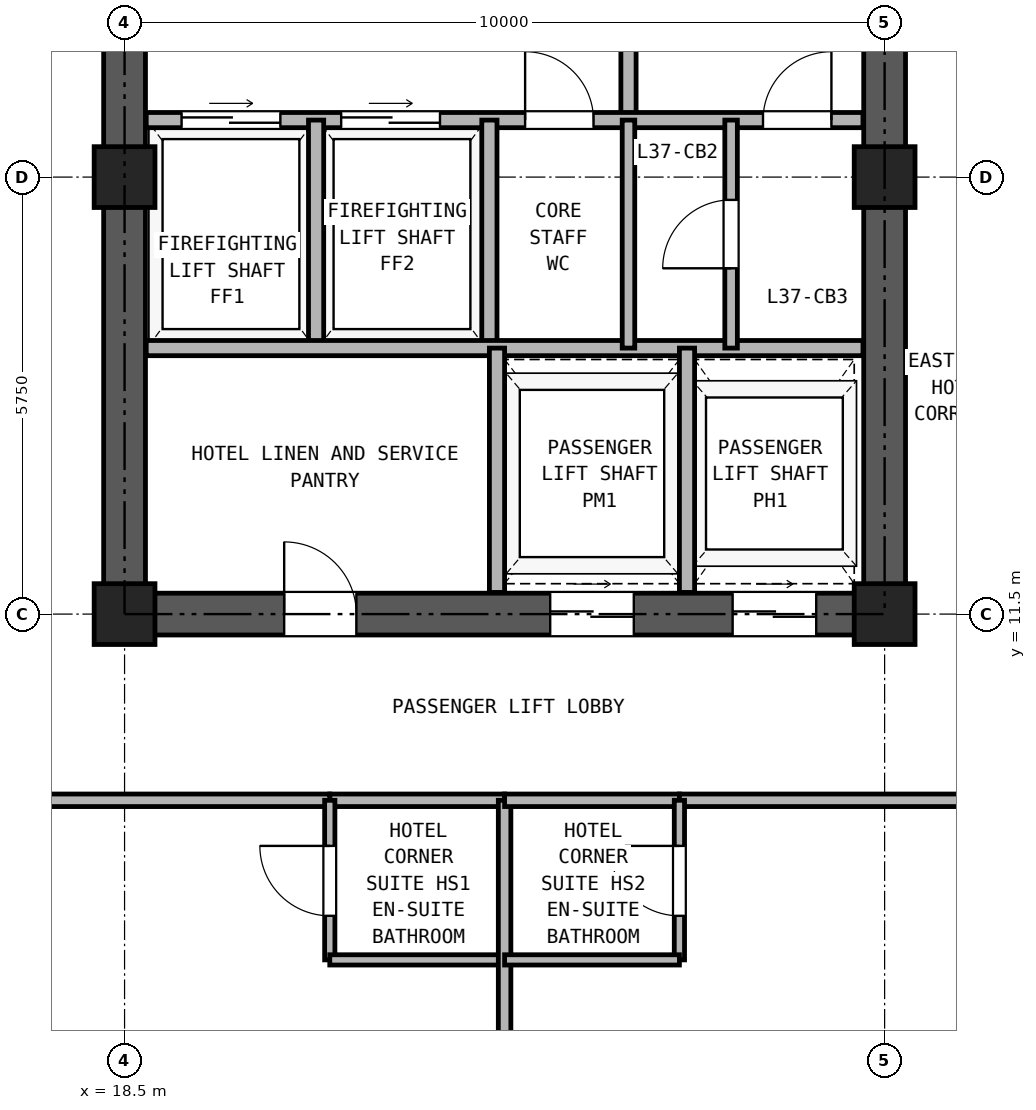
"""IFC4 building model, lengths in metres.
Left out: names, types, materials, properties, quantities, classifications, styles, units other than length and angle.
Written with IfcOpenShell. Run it as: python <this file> out.ifc"""

import sys

from ifc_helpers import new_model, si_unit, direction, frame, frame_2d, origin, origin_2d, place, context, subcontext, project, spatial, rectangle, hollow_rectangle, extrude, source, transform, mapped, element, fill, save


model = new_model("IFC4")
c1 = context("Model", 3, precision=1e-05, world=origin(), true_north=direction((0.0, 1.0)))
c2 = subcontext(c1, "Body", "Model", "MODEL_VIEW")
j1 = project(units=[si_unit("LENGTHUNIT", "METRE"), si_unit("PLANEANGLEUNIT", "RADIAN")], contexts=[c1])
p1 = place(None, origin())
s1 = spatial("IfcSite", under=j1, at=p1, CompositionType="ELEMENT")
p2 = place(p1, origin())
s2 = spatial("IfcBuilding", under=s1, at=p2, CompositionType="ELEMENT")
p3 = place(p2, frame((0.0, 0.0, 134.3)))
s3 = spatial("IfcBuildingStorey", under=s2, at=p3, CompositionType="ELEMENT", Elevation=134.3)
m1 = source(origin(), c2, "Body", "SweptSolid", [
    extrude(hollow_rectangle(XDim=0.8, YDim=0.8, WallThickness=0.045, at=origin_2d()), origin(), (0.0, 0.0, 1.0), 2.95),
])
for number, where, z_axis, x_axis in (
    (1, (18.5, 11.5, 0.0), (0.0, 0.0, 1.0), (1.0, 0.0, 0.0)),
    (2, (18.5, 17.25, 0.0), (0.0, 0.0, 1.0), (1.0, 0.0, 0.0)),
    (3, (28.5, 11.5, 0.0), (0.0, 0.0, 1.0), (1.0, 0.0, 0.0)),
    (4, (28.5, 17.25, 0.0), (0.0, 0.0, 1.0), (1.0, 0.0, 0.0)),
):
    element("IfcColumn", number, at=place(p3, frame(where, z_axis=z_axis, x_axis=x_axis)), inside=s3, PredefinedType="COLUMN", context=c2, shape_type="MappedRepresentation", body=[
        mapped(m1, transform((0.0, 0.0, 0.0), x_axis=(1.0, 0.0, 0.0), y_axis=(0.0, 1.0, 0.0), z_axis=(0.0, 0.0, 1.0), scale=1.0)),
    ])
p4 = place(p3, frame((18.225, 11.5, 0.0), z_axis=(0.0, 0.0, 1.0), x_axis=(1.0, 0.0, 0.0)))
e5 = element("IfcWall", 5, at=p4, inside=s3, PredefinedType="SHEAR", context=c2, shape_type="SweptSolid", body=[
    extrude(rectangle(XDim=10.55, YDim=0.55, at=frame_2d((5.275, 0.0))), origin(), (0.0, 0.0, 1.0), 2.95),
])
p5 = place(p4, frame((2.375, 0.0, 0.0)))
e6 = element("IfcOpeningElement", 6, at=p5, cuts=e5, PredefinedType="OPENING", context=c2, shape_type="SweptSolid", body=[
    extrude(rectangle(XDim=0.95, YDim=2.15, at=frame_2d((0.475, 1.075))), frame((0.0, 0.285, 0.0), z_axis=(0.0, -1.0, 0.0), x_axis=(1.0, 0.0, 0.0)), (0.0, 0.0, 1.0), 0.57),
])
p6 = place(p4, frame((5.875, 0.0, 0.0)))
e7 = element("IfcOpeningElement", 7, at=p6, cuts=e5, PredefinedType="OPENING", context=c2, shape_type="SweptSolid", body=[
    extrude(rectangle(XDim=1.1, YDim=2.25, at=frame_2d((0.55, 1.125))), frame((0.0, 0.285, 0.0), z_axis=(0.0, -1.0, 0.0), x_axis=(1.0, 0.0, 0.0)), (0.0, 0.0, 1.0), 0.57),
])
p7 = place(p4, frame((8.275, 0.0, 0.0)))
e8 = element("IfcOpeningElement", 8, at=p7, cuts=e5, PredefinedType="OPENING", context=c2, shape_type="SweptSolid", body=[
    extrude(rectangle(XDim=1.1, YDim=2.25, at=frame_2d((0.55, 1.125))), frame((0.0, 0.285, 0.0), z_axis=(0.0, -1.0, 0.0), x_axis=(1.0, 0.0, 0.0)), (0.0, 0.0, 1.0), 0.57),
])
p8 = place(p3, frame((18.5, 11.775, 0.0), z_axis=(0.0, 0.0, 1.0), x_axis=(0.0, 1.0, 0.0)))
e9 = element("IfcWall", 9, at=p8, inside=s3, PredefinedType="SHEAR", context=c2, shape_type="SweptSolid", body=[
    extrude(rectangle(XDim=16.7, YDim=0.55, at=frame_2d((8.35, 0.0))), origin(), (0.0, 0.0, 1.0), 2.95),
])
p9 = place(p8, frame((7.375, 0.0, 0.0)))
e10 = element("IfcOpeningElement", 10, at=p9, cuts=e9, PredefinedType="OPENING", context=c2, shape_type="SweptSolid", body=[
    extrude(rectangle(XDim=1.15, YDim=2.2, at=frame_2d((0.575, 1.1))), frame((0.0, 0.285, 0.0), z_axis=(0.0, -1.0, 0.0), x_axis=(1.0, 0.0, 0.0)), (0.0, 0.0, 1.0), 0.57),
])
p10 = place(p3, frame((28.5, 11.775, 0.0), z_axis=(0.0, 0.0, 1.0), x_axis=(0.0, 1.0, 0.0)))
e11 = element("IfcWall", 11, at=p10, inside=s3, PredefinedType="SHEAR", context=c2, shape_type="SweptSolid", body=[
    extrude(rectangle(XDim=16.7, YDim=0.55, at=frame_2d((8.35, 0.0))), origin(), (0.0, 0.0, 1.0), 2.95),
])
p11 = place(p10, frame((7.375, 0.0, 0.0)))
e12 = element("IfcOpeningElement", 12, at=p11, cuts=e11, PredefinedType="OPENING", context=c2, shape_type="SweptSolid", body=[
    extrude(rectangle(XDim=1.15, YDim=2.2, at=frame_2d((0.575, 1.1))), frame((0.0, 0.285, 0.0), z_axis=(0.0, -1.0, 0.0), x_axis=(1.0, 0.0, 0.0)), (0.0, 0.0, 1.0), 0.57),
])
p12 = place(p3, frame((25.13, 18.0, 0.0), z_axis=(0.0, 0.0, 1.0), x_axis=(0.0, 1.0, 0.0)))
e13 = element("IfcWall", 13, at=p12, inside=s3, PredefinedType="PARTITIONING", context=c2, shape_type="SweptSolid", body=[
    extrude(rectangle(XDim=3.39, YDim=0.2, at=frame_2d((1.695, 0.0))), origin(), (0.0, 0.0, 1.0), 2.95),
])
p13 = place(p12, frame((1.1, 0.0, 0.0)))
e14 = element("IfcOpeningElement", 14, at=p13, cuts=e13, PredefinedType="OPENING", context=c2, shape_type="SweptSolid", body=[
    extrude(rectangle(XDim=1.15, YDim=2.2, at=frame_2d((0.575, 1.1))), frame((0.0, 0.11, 0.0), z_axis=(0.0, -1.0, 0.0), x_axis=(1.0, 0.0, 0.0)), (0.0, 0.0, 1.0), 0.22),
])
p14 = place(p3, frame((18.785, 18.0, 0.0), z_axis=(0.0, 0.0, 1.0), x_axis=(1.0, 0.0, 0.0)))
e15 = element("IfcWall", 15, at=p14, inside=s3, PredefinedType="PARTITIONING", context=c2, shape_type="SweptSolid", body=[
    extrude(rectangle(XDim=9.43, YDim=0.2, at=frame_2d((4.715, 0.0))), origin(), (0.0, 0.0, 1.0), 2.95),
])
p15 = place(p14, frame((0.465, 0.0, 0.0)))
e16 = element("IfcOpeningElement", 16, at=p15, cuts=e15, PredefinedType="OPENING", context=c2, shape_type="SweptSolid", body=[
    extrude(rectangle(XDim=1.3, YDim=2.3, at=frame_2d((0.65, 1.15))), frame((0.0, 0.11, 0.0), z_axis=(0.0, -1.0, 0.0), x_axis=(1.0, 0.0, 0.0)), (0.0, 0.0, 1.0), 0.22),
])
p16 = place(p14, frame((2.565, 0.0, 0.0)))
e17 = element("IfcOpeningElement", 17, at=p16, cuts=e15, PredefinedType="OPENING", context=c2, shape_type="SweptSolid", body=[
    extrude(rectangle(XDim=1.3, YDim=2.3, at=frame_2d((0.65, 1.15))), frame((0.0, 0.11, 0.0), z_axis=(0.0, -1.0, 0.0), x_axis=(1.0, 0.0, 0.0)), (0.0, 0.0, 1.0), 0.22),
])
p17 = place(p14, frame((4.985, 0.0, 0.0)))
e18 = element("IfcOpeningElement", 18, at=p17, cuts=e15, PredefinedType="OPENING", context=c2, shape_type="SweptSolid", body=[
    extrude(rectangle(XDim=0.9, YDim=2.05, at=frame_2d((0.45, 1.025))), frame((0.0, 0.11, 0.0), z_axis=(0.0, -1.0, 0.0), x_axis=(1.0, 0.0, 0.0)), (0.0, 0.0, 1.0), 0.22),
])
p18 = place(p14, frame((8.115, 0.0, 0.0)))
e19 = element("IfcOpeningElement", 19, at=p18, cuts=e15, PredefinedType="OPENING", context=c2, shape_type="SweptSolid", body=[
    extrude(rectangle(XDim=0.9, YDim=2.05, at=frame_2d((0.45, 1.025))), frame((0.0, 0.11, 0.0), z_axis=(0.0, -1.0, 0.0), x_axis=(1.0, 0.0, 0.0)), (0.0, 0.0, 1.0), 0.22),
])
for number, where, z_axis, x_axis in (
    (20, (21.02, 15.0, 0.0), (0.0, 0.0, 1.0), (0.0, 1.0, 0.0)),
    (21, (23.3, 15.0, 0.0), (0.0, 0.0, 1.0), (0.0, 1.0, 0.0)),
):
    element("IfcWall", number, at=place(p3, frame(where, z_axis=z_axis, x_axis=x_axis)), inside=s3, PredefinedType="PARTITIONING", context=c2, shape_type="SweptSolid", body=[
        extrude(rectangle(XDim=3.0, YDim=0.2, at=frame_2d((1.5, 0.0))), origin(), (0.0, 0.0, 1.0), 2.95),
    ])
p19 = place(p3, frame((18.785, 15.0, 0.0), z_axis=(0.0, 0.0, 1.0), x_axis=(1.0, 0.0, 0.0)))
e22 = element("IfcWall", 22, at=p19, inside=s3, PredefinedType="PARTITIONING", context=c2, shape_type="SweptSolid", body=[
    extrude(rectangle(XDim=9.43, YDim=0.2, at=frame_2d((4.715, 0.0))), origin(), (0.0, 0.0, 1.0), 2.95),
])
p20 = place(p3, frame((25.13, 15.0, 0.0), z_axis=(0.0, 0.0, 1.0), x_axis=(0.0, 1.0, 0.0)))
e23 = element("IfcWall", 23, at=p20, inside=s3, PredefinedType="PARTITIONING", context=c2, shape_type="SweptSolid", body=[
    extrude(rectangle(XDim=3.0, YDim=0.165, at=frame_2d((1.5, 0.0))), origin(), (0.0, 0.0, 1.0), 2.95),
])
p21 = place(p3, frame((26.48, 15.0, 0.0), z_axis=(0.0, 0.0, 1.0), x_axis=(0.0, 1.0, 0.0)))
e24 = element("IfcWall", 24, at=p21, inside=s3, PredefinedType="PARTITIONING", context=c2, shape_type="SweptSolid", body=[
    extrude(rectangle(XDim=3.0, YDim=0.165, at=frame_2d((1.5, 0.0))), origin(), (0.0, 0.0, 1.0), 2.95),
])
p22 = place(p21, frame((1.05, 0.0, 0.0)))
e25 = element("IfcOpeningElement", 25, at=p22, cuts=e24, PredefinedType="OPENING", context=c2, shape_type="SweptSolid", body=[
    extrude(rectangle(XDim=0.9, YDim=2.05, at=frame_2d((0.45, 1.025))), frame((0.0, 0.093, 0.0), z_axis=(0.0, -1.0, 0.0), x_axis=(1.0, 0.0, 0.0)), (0.0, 0.0, 1.0), 0.185),
])
for number, where, z_axis, x_axis in (
    (26, (23.4, 11.785, 0.0), (0.0, 0.0, 1.0), (0.0, 1.0, 0.0)),
    (27, (25.9, 11.785, 0.0), (0.0, 0.0, 1.0), (0.0, 1.0, 0.0)),
):
    element("IfcWall", number, at=place(p3, frame(where, z_axis=z_axis, x_axis=x_axis)), inside=s3, PredefinedType="PARTITIONING", context=c2, shape_type="SweptSolid", body=[
        extrude(rectangle(XDim=3.215, YDim=0.2, at=frame_2d((1.607, 0.0))), origin(), (0.0, 0.0, 1.0), 2.95),
    ])
p23 = place(p3, frame((21.2, 9.05, 0.0), z_axis=(0.0, 0.0, 1.0), x_axis=(1.0, 0.0, 0.0)))
e28 = element("IfcWall", 28, at=p23, inside=s3, PredefinedType="PARTITIONING", context=c2, shape_type="SweptSolid", body=[
    extrude(rectangle(XDim=2.3, YDim=0.165, at=frame_2d((1.15, 0.0))), origin(), (0.0, 0.0, 1.0), 2.95),
])
p24 = place(p3, frame((6.6, 9.05, 0.0), z_axis=(0.0, 0.0, 1.0), x_axis=(1.0, 0.0, 0.0)))
e29 = element("IfcWall", 29, at=p24, inside=s3, PredefinedType="PARTITIONING", context=c2, shape_type="SweptSolid", body=[
    extrude(rectangle(XDim=14.6, YDim=0.165, at=frame_2d((7.3, 0.0))), origin(), (0.0, 0.0, 1.0), 2.95),
])
p25 = place(p24, frame((6.8, 0.0, 0.0)))
e30 = element("IfcOpeningElement", 30, at=p25, cuts=e29, PredefinedType="OPENING", context=c2, shape_type="SweptSolid", body=[
    extrude(rectangle(XDim=1.0, YDim=2.15, at=frame_2d((0.5, 1.075))), frame((0.0, 0.093, 0.0), z_axis=(0.0, -1.0, 0.0), x_axis=(1.0, 0.0, 0.0)), (0.0, 0.0, 1.0), 0.185),
])
p26 = place(p3, frame((21.2, 6.95, 0.0), z_axis=(0.0, 0.0, 1.0), x_axis=(0.0, 1.0, 0.0)))
e31 = element("IfcWall", 31, at=p26, inside=s3, PredefinedType="PARTITIONING", context=c2, shape_type="SweptSolid", body=[
    extrude(rectangle(XDim=2.1, YDim=0.135, at=frame_2d((1.05, 0.0))), origin(), (0.0, 0.0, 1.0), 2.95),
])
p27 = place(p26, frame((0.58, 0.0, 0.0)))
e32 = element("IfcOpeningElement", 32, at=p27, cuts=e31, PredefinedType="OPENING", context=c2, shape_type="SweptSolid", body=[
    extrude(rectangle(XDim=0.92, YDim=2.1, at=frame_2d((0.46, 1.05))), frame((0.0, 0.077, 0.0), z_axis=(0.0, -1.0, 0.0), x_axis=(1.0, 0.0, 0.0)), (0.0, 0.0, 1.0), 0.155),
])
p28 = place(p3, frame((21.2, 6.95, 0.0), z_axis=(0.0, 0.0, 1.0), x_axis=(1.0, 0.0, 0.0)))
e33 = element("IfcWall", 33, at=p28, inside=s3, PredefinedType="PARTITIONING", context=c2, shape_type="SweptSolid", body=[
    extrude(rectangle(XDim=2.3, YDim=0.135, at=frame_2d((1.15, 0.0))), origin(), (0.0, 0.0, 1.0), 2.95),
])
p29 = place(p3, frame((23.5, 0.16, 0.0), z_axis=(0.0, 0.0, 1.0), x_axis=(0.0, 1.0, 0.0)))
e34 = element("IfcWall", 34, at=p29, inside=s3, PredefinedType="PARTITIONING", context=c2, shape_type="SweptSolid", body=[
    extrude(rectangle(XDim=8.89, YDim=0.165, at=frame_2d((4.445, 0.0))), origin(), (0.0, 0.0, 1.0), 2.95),
])
p30 = place(p3, frame((23.5, 9.05, 0.0), z_axis=(0.0, 0.0, 1.0), x_axis=(1.0, 0.0, 0.0)))
e35 = element("IfcWall", 35, at=p30, inside=s3, PredefinedType="PARTITIONING", context=c2, shape_type="SweptSolid", body=[
    extrude(rectangle(XDim=2.3, YDim=0.165, at=frame_2d((1.15, 0.0))), origin(), (0.0, 0.0, 1.0), 2.95),
])
p31 = place(p3, frame((25.8, 9.05, 0.0), z_axis=(0.0, 0.0, 1.0), x_axis=(1.0, 0.0, 0.0)))
e36 = element("IfcWall", 36, at=p31, inside=s3, PredefinedType="PARTITIONING", context=c2, shape_type="SweptSolid", body=[
    extrude(rectangle(XDim=14.6, YDim=0.165, at=frame_2d((7.3, 0.0))), origin(), (0.0, 0.0, 1.0), 2.95),
])
p32 = place(p31, frame((6.8, 0.0, 0.0)))
e37 = element("IfcOpeningElement", 37, at=p32, cuts=e36, PredefinedType="OPENING", context=c2, shape_type="SweptSolid", body=[
    extrude(rectangle(XDim=1.0, YDim=2.15, at=frame_2d((0.5, 1.075))), frame((0.0, 0.093, 0.0), z_axis=(0.0, -1.0, 0.0), x_axis=(1.0, 0.0, 0.0)), (0.0, 0.0, 1.0), 0.185),
])
p33 = place(p3, frame((25.8, 6.95, 0.0), z_axis=(0.0, 0.0, 1.0), x_axis=(0.0, 1.0, 0.0)))
e38 = element("IfcWall", 38, at=p33, inside=s3, PredefinedType="PARTITIONING", context=c2, shape_type="SweptSolid", body=[
    extrude(rectangle(XDim=2.1, YDim=0.135, at=frame_2d((1.05, 0.0))), origin(), (0.0, 0.0, 1.0), 2.95),
])
p34 = place(p33, frame((0.58, 0.0, 0.0)))
e39 = element("IfcOpeningElement", 39, at=p34, cuts=e38, PredefinedType="OPENING", context=c2, shape_type="SweptSolid", body=[
    extrude(rectangle(XDim=0.92, YDim=2.1, at=frame_2d((0.46, 1.05))), frame((0.0, 0.077, 0.0), z_axis=(0.0, -1.0, 0.0), x_axis=(1.0, 0.0, 0.0)), (0.0, 0.0, 1.0), 0.155),
])
p35 = place(p3, frame((23.5, 6.95, 0.0), z_axis=(0.0, 0.0, 1.0), x_axis=(1.0, 0.0, 0.0)))
e40 = element("IfcWall", 40, at=p35, inside=s3, PredefinedType="PARTITIONING", context=c2, shape_type="SweptSolid", body=[
    extrude(rectangle(XDim=2.3, YDim=0.135, at=frame_2d((1.15, 0.0))), origin(), (0.0, 0.0, 1.0), 2.95),
])
p36 = place(p15, origin())
e41 = element("IfcDoor", 41, at=p36, inside=s3, OperationType="DOUBLE_DOOR_SLIDING", PredefinedType="DOOR", context=c2, shape_type="SweptSolid", body=[
    extrude(rectangle(XDim=1.3, YDim=2.3, at=frame_2d((0.65, 1.15))), frame((0.0, 0.025, 0.0), z_axis=(0.0, -1.0, 0.0), x_axis=(1.0, 0.0, 0.0)), (0.0, 0.0, 1.0), 0.05),
])
fill(e16, e41)
p37 = place(p16, origin())
e42 = element("IfcDoor", 42, at=p37, inside=s3, OperationType="DOUBLE_DOOR_SLIDING", PredefinedType="DOOR", context=c2, shape_type="SweptSolid", body=[
    extrude(rectangle(XDim=1.3, YDim=2.3, at=frame_2d((0.65, 1.15))), frame((0.0, 0.025, 0.0), z_axis=(0.0, -1.0, 0.0), x_axis=(1.0, 0.0, 0.0)), (0.0, 0.0, 1.0), 0.05),
])
fill(e17, e42)
p38 = place(p17, frame((0.9, 0.0, 0.0), z_axis=(0.0, 0.0, 1.0), x_axis=(-1.0, 0.0, 0.0)))
e43 = element("IfcDoor", 43, at=p38, inside=s3, OperationType="SINGLE_SWING_LEFT", PredefinedType="DOOR", context=c2, shape_type="SweptSolid", body=[
    extrude(rectangle(XDim=0.9, YDim=2.05, at=frame_2d((0.45, 1.025))), frame((0.0, 0.025, 0.0), z_axis=(0.0, -1.0, 0.0), x_axis=(1.0, 0.0, 0.0)), (0.0, 0.0, 1.0), 0.05),
])
fill(e18, e43)
p39 = place(p22, origin())
e44 = element("IfcDoor", 44, at=p39, inside=s3, OperationType="SINGLE_SWING_LEFT", PredefinedType="DOOR", context=c2, shape_type="SweptSolid", body=[
    extrude(rectangle(XDim=0.9, YDim=2.05, at=frame_2d((0.45, 1.025))), frame((0.0, 0.025, 0.0), z_axis=(0.0, -1.0, 0.0), x_axis=(1.0, 0.0, 0.0)), (0.0, 0.0, 1.0), 0.05),
])
fill(e25, e44)
p40 = place(p18, frame((0.9, 0.0, 0.0), z_axis=(0.0, 0.0, 1.0), x_axis=(-1.0, 0.0, 0.0)))
e45 = element("IfcDoor", 45, at=p40, inside=s3, OperationType="SINGLE_SWING_RIGHT", PredefinedType="DOOR", context=c2, shape_type="SweptSolid", body=[
    extrude(rectangle(XDim=0.9, YDim=2.05, at=frame_2d((0.45, 1.025))), frame((0.0, 0.025, 0.0), z_axis=(0.0, -1.0, 0.0), x_axis=(1.0, 0.0, 0.0)), (0.0, 0.0, 1.0), 0.05),
])
fill(e19, e45)
p41 = place(p5, frame((0.95, 0.0, 0.0), z_axis=(0.0, 0.0, 1.0), x_axis=(-1.0, 0.0, 0.0)))
e46 = element("IfcDoor", 46, at=p41, inside=s3, OperationType="SINGLE_SWING_LEFT", PredefinedType="DOOR", context=c2, shape_type="SweptSolid", body=[
    extrude(rectangle(XDim=0.95, YDim=2.15, at=frame_2d((0.475, 1.075))), frame((0.0, 0.025, 0.0), z_axis=(0.0, -1.0, 0.0), x_axis=(1.0, 0.0, 0.0)), (0.0, 0.0, 1.0), 0.05),
])
fill(e6, e46)
p42 = place(p6, frame((1.1, 0.0, 0.0), z_axis=(0.0, 0.0, 1.0), x_axis=(-1.0, 0.0, 0.0)))
e47 = element("IfcDoor", 47, at=p42, inside=s3, OperationType="DOUBLE_DOOR_SLIDING", PredefinedType="DOOR", context=c2, shape_type="SweptSolid", body=[
    extrude(rectangle(XDim=1.1, YDim=2.25, at=frame_2d((0.55, 1.125))), frame((0.0, 0.025, 0.0), z_axis=(0.0, -1.0, 0.0), x_axis=(1.0, 0.0, 0.0)), (0.0, 0.0, 1.0), 0.05),
])
fill(e7, e47)
p43 = place(p7, frame((1.1, 0.0, 0.0), z_axis=(0.0, 0.0, 1.0), x_axis=(-1.0, 0.0, 0.0)))
e48 = element("IfcDoor", 48, at=p43, inside=s3, OperationType="DOUBLE_DOOR_SLIDING", PredefinedType="DOOR", context=c2, shape_type="SweptSolid", body=[
    extrude(rectangle(XDim=1.1, YDim=2.25, at=frame_2d((0.55, 1.125))), frame((0.0, 0.025, 0.0), z_axis=(0.0, -1.0, 0.0), x_axis=(1.0, 0.0, 0.0)), (0.0, 0.0, 1.0), 0.05),
])
fill(e8, e48)
p44 = place(p27, origin())
e49 = element("IfcDoor", 49, at=p44, inside=s3, OperationType="SINGLE_SWING_RIGHT", PredefinedType="DOOR", context=c2, shape_type="SweptSolid", body=[
    extrude(rectangle(XDim=0.92, YDim=2.1, at=frame_2d((0.46, 1.05))), frame((0.0, 0.025, 0.0), z_axis=(0.0, -1.0, 0.0), x_axis=(1.0, 0.0, 0.0)), (0.0, 0.0, 1.0), 0.05),
])
fill(e32, e49)
p45 = place(p34, frame((0.92, 0.0, 0.0), z_axis=(0.0, 0.0, 1.0), x_axis=(-1.0, 0.0, 0.0)))
e50 = element("IfcDoor", 50, at=p45, inside=s3, OperationType="SINGLE_SWING_RIGHT", PredefinedType="DOOR", context=c2, shape_type="SweptSolid", body=[
    extrude(rectangle(XDim=0.92, YDim=2.1, at=frame_2d((0.46, 1.05))), frame((0.0, 0.025, 0.0), z_axis=(0.0, -1.0, 0.0), x_axis=(1.0, 0.0, 0.0)), (0.0, 0.0, 1.0), 0.05),
])
fill(e39, e50)
save(model, sys.argv[1])
